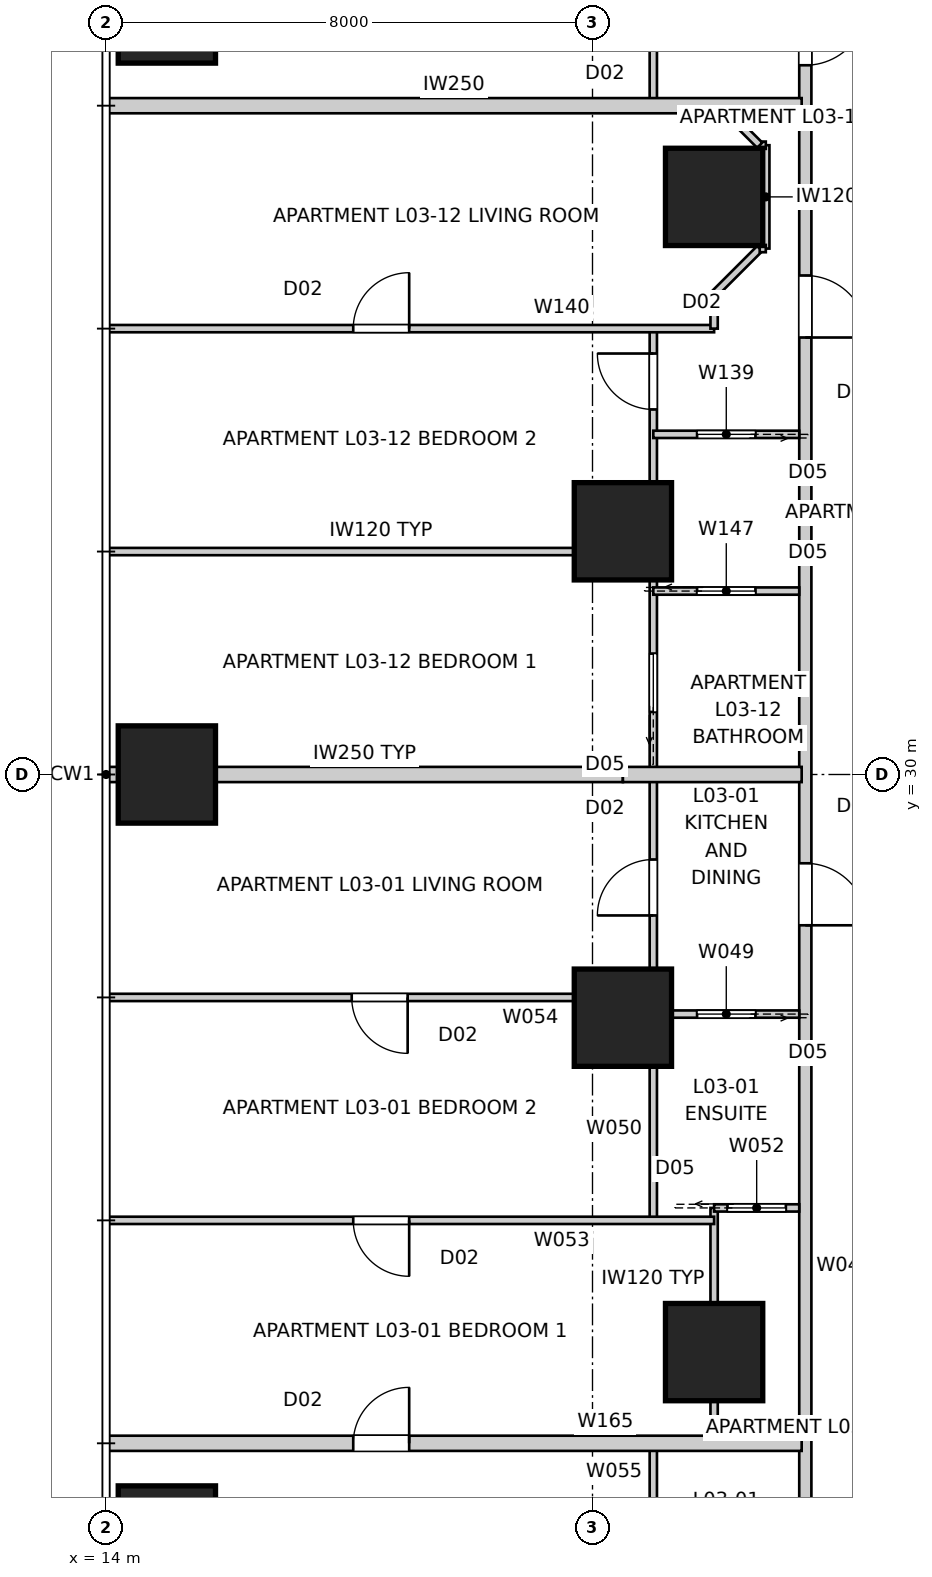
"""IFC4 building model, lengths in metres.
Left out: names, types, materials, properties, quantities, classifications, styles, units other than length and angle.
Written with IfcOpenShell. Run it as: python <this file> out.ifc"""

import sys

from ifc_helpers import new_model, si_unit, direction, frame, frame_2d, origin, origin_2d, place, context, subcontext, project, spatial, rectangle, extrude, element, fill, save


model = new_model("IFC4")
c1 = context("Model", 3, precision=1e-05, world=origin(), true_north=direction((0.0, 1.0)))
c2 = subcontext(c1, "Body", "Model", "MODEL_VIEW")
j1 = project(units=[si_unit("LENGTHUNIT", "METRE"), si_unit("PLANEANGLEUNIT", "RADIAN")], contexts=[c1])
p1 = place(None, origin())
s1 = spatial("IfcSite", under=j1, at=p1, CompositionType="ELEMENT")
p2 = place(p1, origin())
s2 = spatial("IfcBuilding", under=s1, at=p2, CompositionType="ELEMENT")
p3 = place(p2, frame((0.0, 0.0, 15.0)))
s3 = spatial("IfcBuildingStorey", under=s2, at=p3, CompositionType="ELEMENT", Elevation=15.0)
for number, where, z_axis, x_axis in (
    (1, (15.0, 42.5, 0.0), (0.0, 0.0, 1.0), (1.0, 0.0, 0.0)),
    (2, (15.0, 30.0, 0.0), (0.0, 0.0, 1.0), (1.0, 0.0, 0.0)),
    (3, (15.0, 17.5, 0.0), (0.0, 0.0, 1.0), (1.0, 0.0, 0.0)),
    (4, (24.0, 39.5, 0.0), (0.0, 0.0, 1.0), (1.0, 0.0, 0.0)),
    (5, (22.5, 34.0, 0.0), (0.0, 0.0, 1.0), (1.0, 0.0, 0.0)),
    (6, (22.5, 26.0, 0.0), (0.0, 0.0, 1.0), (1.0, 0.0, 0.0)),
    (7, (24.0, 20.5, 0.0), (0.0, 0.0, 1.0), (1.0, 0.0, 0.0)),
):
    element("IfcColumn", number, at=place(p3, frame(where, z_axis=z_axis, x_axis=x_axis)), inside=s3, PredefinedType="COLUMN", context=c2, shape_type="SweptSolid", body=[
        extrude(rectangle(XDim=1.6, YDim=1.6, at=origin_2d()), origin(), (0.0, 0.0, 1.0), 3.4),
    ])
p4 = place(p3, frame((25.5, 43.7, 0.0), z_axis=(0.0, 0.0, 1.0), x_axis=(0.0, -1.0, 0.0)))
e8 = element("IfcWall", 8, at=p4, inside=s3, PredefinedType="PARTITIONING", context=c2, shape_type="SweptSolid", body=[
    extrude(rectangle(XDim=27.4, YDim=0.2, at=frame_2d((13.7, 0.0))), origin(), (0.0, 0.0, 1.0), 3.25),
])
p5 = place(p4, frame((5.493, 0.0, 0.0)))
e9 = element("IfcOpeningElement", 9, at=p5, cuts=e8, PredefinedType="OPENING", context=c2, shape_type="SweptSolid", body=[
    extrude(rectangle(XDim=1.02, YDim=2.34, at=frame_2d((0.51, 1.17))), frame((0.0, 0.11, 0.0), z_axis=(0.0, -1.0, 0.0), x_axis=(1.0, 0.0, 0.0)), (0.0, 0.0, 1.0), 0.22),
])
p6 = place(p4, frame((15.16, 0.0, 0.0)))
e10 = element("IfcOpeningElement", 10, at=p6, cuts=e8, PredefinedType="OPENING", context=c2, shape_type="SweptSolid", body=[
    extrude(rectangle(XDim=1.02, YDim=2.34, at=frame_2d((0.51, 1.17))), frame((0.0, 0.11, 0.0), z_axis=(0.0, -1.0, 0.0), x_axis=(1.0, 0.0, 0.0)), (0.0, 0.0, 1.0), 0.22),
])
p7 = place(p4, frame((1.015, 0.0, 0.0)))
e11 = element("IfcOpeningElement", 11, at=p7, cuts=e8, PredefinedType="OPENING", context=c2, shape_type="SweptSolid", body=[
    extrude(rectangle(XDim=1.02, YDim=2.34, at=frame_2d((0.51, 1.17))), frame((0.0, 0.11, 0.0), z_axis=(0.0, -1.0, 0.0), x_axis=(1.0, 0.0, 0.0)), (0.0, 0.0, 1.0), 0.22),
])
p8 = place(p3, frame((14.0, 41.0, 0.0), z_axis=(0.0, 0.0, 1.0), x_axis=(1.0, 0.0, 0.0)))
e12 = element("IfcWall", 12, at=p8, inside=s3, PredefinedType="PARTITIONING", context=c2, shape_type="SweptSolid", body=[
    extrude(rectangle(XDim=11.44, YDim=0.25, at=frame_2d((5.72, 0.0))), origin(), (0.0, 0.0, 1.0), 3.25),
])
p9 = place(p3, frame((14.0, 30.0, 0.0), z_axis=(0.0, 0.0, 1.0), x_axis=(1.0, 0.0, 0.0)))
e13 = element("IfcWall", 13, at=p9, inside=s3, PredefinedType="PARTITIONING", context=c2, shape_type="SweptSolid", body=[
    extrude(rectangle(XDim=8.5, YDim=0.25, at=frame_2d((4.25, 0.0))), origin(), (0.0, 0.0, 1.0), 3.25),
])
p10 = place(p3, frame((22.5, 30.0, 0.0), z_axis=(0.0, 0.0, 1.0), x_axis=(1.0, 0.0, 0.0)))
e14 = element("IfcWall", 14, at=p10, inside=s3, PredefinedType="PARTITIONING", context=c2, shape_type="SweptSolid", body=[
    extrude(rectangle(XDim=2.94, YDim=0.25, at=frame_2d((1.47, 0.0))), origin(), (0.0, 0.0, 1.0), 2.796),
])
p11 = place(p3, frame((14.0, 19.0, 0.0), z_axis=(0.0, 0.0, 1.0), x_axis=(1.0, 0.0, 0.0)))
e15 = element("IfcWall", 15, at=p11, inside=s3, PredefinedType="PARTITIONING", context=c2, shape_type="SweptSolid", body=[
    extrude(rectangle(XDim=11.44, YDim=0.25, at=frame_2d((5.72, 0.0))), origin(), (0.0, 0.0, 1.0), 3.25),
])
p12 = place(p11, frame((4.065, 0.0, 0.0)))
e16 = element("IfcOpeningElement", 16, at=p12, cuts=e15, PredefinedType="OPENING", context=c2, shape_type="SweptSolid", body=[
    extrude(rectangle(XDim=0.92, YDim=2.34, at=frame_2d((0.46, 1.17))), frame((0.0, 0.135, 0.0), z_axis=(0.0, -1.0, 0.0), x_axis=(1.0, 0.0, 0.0)), (0.0, 0.0, 1.0), 0.27),
])
p13 = place(p3, frame((25.4, 26.06, 0.0), z_axis=(0.0, 0.0, 1.0), x_axis=(-1.0, 0.0, 0.0)))
e17 = element("IfcWall", 17, at=p13, inside=s3, PredefinedType="PARTITIONING", context=c2, shape_type="SweptSolid", body=[
    extrude(rectangle(XDim=2.4, YDim=0.12, at=frame_2d((1.2, 0.0))), origin(), (0.0, 0.0, 1.0), 3.25),
])
p14 = place(p13, frame((0.72, 0.0, 0.0)))
e18 = element("IfcOpeningElement", 18, at=p14, cuts=e17, PredefinedType="OPENING", context=c2, shape_type="SweptSolid", body=[
    extrude(rectangle(XDim=0.96, YDim=2.1, at=frame_2d((0.48, 1.05))), frame((0.0, 0.07, 0.0), z_axis=(0.0, -1.0, 0.0), x_axis=(1.0, 0.0, 0.0)), (0.0, 0.0, 1.0), 0.14),
])
p15 = place(p3, frame((23.0, 22.667, 0.0), z_axis=(0.0, 0.0, 1.0), x_axis=(0.0, 1.0, 0.0)))
e19 = element("IfcWall", 19, at=p15, inside=s3, PredefinedType="PARTITIONING", context=c2, shape_type="SweptSolid", body=[
    extrude(rectangle(XDim=14.667, YDim=0.12, at=frame_2d((7.333, 0.0))), origin(), (0.0, 0.0, 1.0), 2.549),
])
p16 = place(p15, frame((13.337, 0.0, 0.0)))
e20 = element("IfcOpeningElement", 20, at=p16, cuts=e19, PredefinedType="OPENING", context=c2, shape_type="SweptSolid", body=[
    extrude(rectangle(XDim=0.92, YDim=2.34, at=frame_2d((0.46, 1.17))), frame((0.0, 0.07, 0.0), z_axis=(0.0, -1.0, 0.0), x_axis=(1.0, 0.0, 0.0)), (0.0, 0.0, 1.0), 0.14),
])
p17 = place(p15, frame((5.015, 0.0, 0.0)))
e21 = element("IfcOpeningElement", 21, at=p17, cuts=e19, PredefinedType="OPENING", context=c2, shape_type="SweptSolid", body=[
    extrude(rectangle(XDim=0.92, YDim=2.34, at=frame_2d((0.46, 1.17))), frame((0.0, 0.07, 0.0), z_axis=(0.0, -1.0, 0.0), x_axis=(1.0, 0.0, 0.0)), (0.0, 0.0, 1.0), 0.14),
])
p18 = place(p15, frame((8.362, 0.0, 0.0)))
e22 = element("IfcOpeningElement", 22, at=p18, cuts=e19, PredefinedType="OPENING", context=c2, shape_type="SweptSolid", body=[
    extrude(rectangle(XDim=0.96, YDim=2.1, at=frame_2d((0.48, 1.05))), frame((0.0, 0.07, 0.0), z_axis=(0.0, -1.0, 0.0), x_axis=(1.0, 0.0, 0.0)), (0.0, 0.0, 1.0), 0.14),
])
p19 = place(p3, frame((24.0, 19.0, 0.0), z_axis=(0.0, 0.0, 1.0), x_axis=(0.0, 1.0, 0.0)))
e23 = element("IfcWall", 23, at=p19, inside=s3, PredefinedType="PARTITIONING", context=c2, shape_type="SweptSolid", body=[
    extrude(rectangle(XDim=3.871, YDim=0.12, at=frame_2d((1.936, 0.0))), origin(), (0.0, 0.0, 1.0), 2.549),
])
p20 = place(p3, frame((24.0, 22.871, 0.0), z_axis=(0.0, 0.0, 1.0), x_axis=(1.0, 0.0, 0.0)))
e24 = element("IfcWall", 24, at=p20, inside=s3, PredefinedType="PARTITIONING", context=c2, shape_type="SweptSolid", body=[
    extrude(rectangle(XDim=1.4, YDim=0.12, at=frame_2d((0.7, 0.0))), origin(), (0.0, 0.0, 1.0), 3.25),
])
p21 = place(p20, frame((0.22, 0.0, 0.0)))
e25 = element("IfcOpeningElement", 25, at=p21, cuts=e24, PredefinedType="OPENING", context=c2, shape_type="SweptSolid", body=[
    extrude(rectangle(XDim=0.96, YDim=2.1, at=frame_2d((0.48, 1.05))), frame((0.0, 0.07, 0.0), z_axis=(0.0, -1.0, 0.0), x_axis=(1.0, 0.0, 0.0)), (0.0, 0.0, 1.0), 0.14),
])
p22 = place(p3, frame((24.0, 22.667, 0.0), z_axis=(0.0, 0.0, 1.0), x_axis=(-1.0, 0.0, 0.0)))
e26 = element("IfcWall", 26, at=p22, inside=s3, PredefinedType="PARTITIONING", context=c2, shape_type="SweptSolid", body=[
    extrude(rectangle(XDim=9.96, YDim=0.12, at=frame_2d((4.98, 0.0))), origin(), (0.0, 0.0, 1.0), 3.25),
])
p23 = place(p22, frame((5.015, 0.0, 0.0)))
e27 = element("IfcOpeningElement", 27, at=p23, cuts=e26, PredefinedType="OPENING", context=c2, shape_type="SweptSolid", body=[
    extrude(rectangle(XDim=0.92, YDim=2.34, at=frame_2d((0.46, 1.17))), frame((0.0, 0.07, 0.0), z_axis=(0.0, -1.0, 0.0), x_axis=(1.0, 0.0, 0.0)), (0.0, 0.0, 1.0), 0.14),
])
p24 = place(p3, frame((23.0, 26.333, 0.0), z_axis=(0.0, 0.0, 1.0), x_axis=(-1.0, 0.0, 0.0)))
e28 = element("IfcWall", 28, at=p24, inside=s3, PredefinedType="PARTITIONING", context=c2, shape_type="SweptSolid", body=[
    extrude(rectangle(XDim=8.96, YDim=0.12, at=frame_2d((4.48, 0.0))), origin(), (0.0, 0.0, 1.0), 3.25),
])
p25 = place(p24, frame((4.04, 0.0, 0.0)))
e29 = element("IfcOpeningElement", 29, at=p25, cuts=e28, PredefinedType="OPENING", context=c2, shape_type="SweptSolid", body=[
    extrude(rectangle(XDim=0.92, YDim=2.34, at=frame_2d((0.46, 1.17))), frame((0.0, 0.07, 0.0), z_axis=(0.0, -1.0, 0.0), x_axis=(1.0, 0.0, 0.0)), (0.0, 0.0, 1.0), 0.14),
])
p26 = place(p3, frame((23.0, 16.2, 0.0), z_axis=(0.0, 0.0, 1.0), x_axis=(0.0, 1.0, 0.0)))
e30 = element("IfcWall", 30, at=p26, inside=s3, PredefinedType="PARTITIONING", context=c2, shape_type="SweptSolid", body=[
    extrude(rectangle(XDim=2.8, YDim=0.12, at=frame_2d((1.4, 0.0))), origin(), (0.0, 0.0, 1.0), 3.25),
])
p27 = place(p26, frame((0.94, 0.0, 0.0)))
e31 = element("IfcOpeningElement", 31, at=p27, cuts=e30, PredefinedType="OPENING", context=c2, shape_type="SweptSolid", body=[
    extrude(rectangle(XDim=0.92, YDim=2.34, at=frame_2d((0.46, 1.17))), frame((0.0, 0.07, 0.0), z_axis=(0.0, -1.0, 0.0), x_axis=(1.0, 0.0, 0.0)), (0.0, 0.0, 1.0), 0.14),
])
p28 = place(p3, frame((23.0, 41.0, 0.0), z_axis=(0.0, 0.0, 1.0), x_axis=(0.0, 1.0, 0.0)))
e32 = element("IfcWall", 32, at=p28, inside=s3, PredefinedType="PARTITIONING", context=c2, shape_type="SweptSolid", body=[
    extrude(rectangle(XDim=6.0, YDim=0.12, at=frame_2d((3.0, 0.0))), origin(), (0.0, 0.0, 1.0), 3.25),
])
p29 = place(p28, frame((1.351, 0.0, 0.0)))
e33 = element("IfcOpeningElement", 33, at=p29, cuts=e32, PredefinedType="OPENING", context=c2, shape_type="SweptSolid", body=[
    extrude(rectangle(XDim=0.92, YDim=2.34, at=frame_2d((0.46, 1.17))), frame((0.0, 0.07, 0.0), z_axis=(0.0, -1.0, 0.0), x_axis=(1.0, 0.0, 0.0)), (0.0, 0.0, 1.0), 0.14),
])
p30 = place(p3, frame((25.4, 35.594, 0.0), z_axis=(0.0, 0.0, 1.0), x_axis=(-1.0, 0.0, 0.0)))
e34 = element("IfcWall", 34, at=p30, inside=s3, PredefinedType="PARTITIONING", context=c2, shape_type="SweptSolid", body=[
    extrude(rectangle(XDim=2.4, YDim=0.12, at=frame_2d((1.2, 0.0))), origin(), (0.0, 0.0, 1.0), 3.25),
])
p31 = place(p30, frame((0.72, 0.0, 0.0)))
e35 = element("IfcOpeningElement", 35, at=p31, cuts=e34, PredefinedType="OPENING", context=c2, shape_type="SweptSolid", body=[
    extrude(rectangle(XDim=0.96, YDim=2.1, at=frame_2d((0.48, 1.05))), frame((0.0, 0.07, 0.0), z_axis=(0.0, -1.0, 0.0), x_axis=(1.0, 0.0, 0.0)), (0.0, 0.0, 1.0), 0.14),
])
p32 = place(p3, frame((14.04, 37.333, 0.0), z_axis=(0.0, 0.0, 1.0), x_axis=(1.0, 0.0, 0.0)))
e36 = element("IfcWall", 36, at=p32, inside=s3, PredefinedType="PARTITIONING", context=c2, shape_type="SweptSolid", body=[
    extrude(rectangle(XDim=9.96, YDim=0.12, at=frame_2d((4.98, 0.0))), origin(), (0.0, 0.0, 1.0), 3.25),
])
p33 = place(p32, frame((4.025, 0.0, 0.0)))
e37 = element("IfcOpeningElement", 37, at=p33, cuts=e36, PredefinedType="OPENING", context=c2, shape_type="SweptSolid", body=[
    extrude(rectangle(XDim=0.92, YDim=2.34, at=frame_2d((0.46, 1.17))), frame((0.0, 0.07, 0.0), z_axis=(0.0, -1.0, 0.0), x_axis=(1.0, 0.0, 0.0)), (0.0, 0.0, 1.0), 0.14),
])
p34 = place(p3, frame((24.0, 37.333, 0.0), z_axis=(0.0, 0.0, 1.0), x_axis=(0.0, 1.0, 0.0)))
e38 = element("IfcWall", 38, at=p34, inside=s3, PredefinedType="PARTITIONING", context=c2, shape_type="SweptSolid", body=[
    extrude(rectangle(XDim=0.567, YDim=0.12, at=frame_2d((0.283, 0.0))), origin(), (0.0, 0.0, 1.0), 3.25),
])
p35 = place(p3, frame((24.0, 37.9, 0.0), z_axis=(0.0, 0.0, 1.0), x_axis=(0.707106781187, 0.707106781187, 0.0)))
e39 = element("IfcWall", 39, at=p35, inside=s3, PredefinedType="PARTITIONING", context=c2, shape_type="SweptSolid", body=[
    extrude(rectangle(XDim=1.061, YDim=0.12, at=frame_2d((0.53, 0.0))), origin(), (0.0, 0.0, 1.0), 3.25),
])
p36 = place(p3, frame((24.85, 38.65, 0.0), z_axis=(0.0, 0.0, 1.0), x_axis=(0.0, 1.0, 0.0)))
e40 = element("IfcWall", 40, at=p36, inside=s3, PredefinedType="PARTITIONING", context=c2, shape_type="SweptSolid", body=[
    extrude(rectangle(XDim=1.7, YDim=0.12, at=frame_2d((0.85, 0.0))), origin(), (0.0, 0.0, 1.0), 3.25),
])
p37 = place(p3, frame((24.75, 40.35, 0.0), z_axis=(0.0, 0.0, 1.0), x_axis=(-0.707106781187, 0.707106781187, 0.0)))
e41 = element("IfcWall", 41, at=p37, inside=s3, PredefinedType="PARTITIONING", context=c2, shape_type="SweptSolid", body=[
    extrude(rectangle(XDim=0.919, YDim=0.12, at=frame_2d((0.459, 0.0))), origin(), (0.0, 0.0, 1.0), 3.25),
])
p38 = place(p3, frame((23.0, 33.017, 0.0), z_axis=(0.0, 0.0, 1.0), x_axis=(1.0, 0.0, 0.0)))
e42 = element("IfcWall", 42, at=p38, inside=s3, PredefinedType="PARTITIONING", context=c2, shape_type="SweptSolid", body=[
    extrude(rectangle(XDim=2.4, YDim=0.12, at=frame_2d((1.2, 0.0))), origin(), (0.0, 0.0, 1.0), 3.25),
])
p39 = place(p38, frame((0.72, 0.0, 0.0)))
e43 = element("IfcOpeningElement", 43, at=p39, cuts=e42, PredefinedType="OPENING", context=c2, shape_type="SweptSolid", body=[
    extrude(rectangle(XDim=0.96, YDim=2.1, at=frame_2d((0.48, 1.05))), frame((0.0, 0.07, 0.0), z_axis=(0.0, -1.0, 0.0), x_axis=(1.0, 0.0, 0.0)), (0.0, 0.0, 1.0), 0.14),
])
p40 = place(p3, frame((14.04, 33.667, 0.0), z_axis=(0.0, 0.0, 1.0), x_axis=(1.0, 0.0, 0.0)))
e44 = element("IfcWall", 44, at=p40, inside=s3, PredefinedType="PARTITIONING", context=c2, shape_type="SweptSolid", body=[
    extrude(rectangle(XDim=8.96, YDim=0.12, at=frame_2d((4.48, 0.0))), origin(), (0.0, 0.0, 1.0), 3.25),
])
for number, where, z_axis, x_axis in (
    (45, (24.85, 38.65, 0.0), (0.0, 0.0, 1.0), (-1.0, 0.0, 0.0)),
    (46, (24.85, 40.35, 0.0), (0.0, 0.0, 1.0), (-1.0, 0.0, 0.0)),
):
    element("IfcWall", number, at=place(p3, frame(where, z_axis=z_axis, x_axis=x_axis)), inside=s3, PredefinedType="PARTITIONING", context=c2, shape_type="SweptSolid", body=[
        extrude(rectangle(XDim=0.1, YDim=0.12, at=frame_2d((0.05, 0.0))), origin(), (0.0, 0.0, 1.0), 3.25),
    ])
p41 = place(p5, origin())
e47 = element("IfcDoor", 47, at=p41, inside=s3, OperationType="SINGLE_SWING_RIGHT", PredefinedType="DOOR", context=c2, shape_type="SweptSolid", body=[
    extrude(rectangle(XDim=1.02, YDim=2.34, at=frame_2d((0.51, 1.17))), frame((0.0, 0.025, 0.0), z_axis=(0.0, -1.0, 0.0), x_axis=(1.0, 0.0, 0.0)), (0.0, 0.0, 1.0), 0.05),
])
fill(e9, e47)
p42 = place(p6, origin())
e48 = element("IfcDoor", 48, at=p42, inside=s3, OperationType="SINGLE_SWING_RIGHT", PredefinedType="DOOR", context=c2, shape_type="SweptSolid", body=[
    extrude(rectangle(XDim=1.02, YDim=2.34, at=frame_2d((0.51, 1.17))), frame((0.0, 0.025, 0.0), z_axis=(0.0, -1.0, 0.0), x_axis=(1.0, 0.0, 0.0)), (0.0, 0.0, 1.0), 0.05),
])
fill(e10, e48)
p43 = place(p7, origin())
e49 = element("IfcDoor", 49, at=p43, inside=s3, OperationType="SINGLE_SWING_LEFT", PredefinedType="DOOR", context=c2, shape_type="SweptSolid", body=[
    extrude(rectangle(XDim=1.02, YDim=2.34, at=frame_2d((0.51, 1.17))), frame((0.0, 0.025, 0.0), z_axis=(0.0, -1.0, 0.0), x_axis=(1.0, 0.0, 0.0)), (0.0, 0.0, 1.0), 0.05),
])
fill(e11, e49)
p44 = place(p31, origin())
e50 = element("IfcDoor", 50, at=p44, inside=s3, OperationType="SLIDING_TO_LEFT", PredefinedType="DOOR", context=c2, shape_type="SweptSolid", body=[
    extrude(rectangle(XDim=0.96, YDim=2.1, at=frame_2d((0.48, 1.05))), frame((0.0, 0.025, 0.0), z_axis=(0.0, -1.0, 0.0), x_axis=(1.0, 0.0, 0.0)), (0.0, 0.0, 1.0), 0.05),
])
fill(e35, e50)
p45 = place(p16, origin())
e51 = element("IfcDoor", 51, at=p45, inside=s3, OperationType="SINGLE_SWING_RIGHT", PredefinedType="DOOR", context=c2, shape_type="SweptSolid", body=[
    extrude(rectangle(XDim=0.92, YDim=2.34, at=frame_2d((0.46, 1.17))), frame((0.0, 0.025, 0.0), z_axis=(0.0, -1.0, 0.0), x_axis=(1.0, 0.0, 0.0)), (0.0, 0.0, 1.0), 0.05),
])
fill(e20, e51)
p46 = place(p17, origin())
e52 = element("IfcDoor", 52, at=p46, inside=s3, OperationType="SINGLE_SWING_LEFT", PredefinedType="DOOR", context=c2, shape_type="SweptSolid", body=[
    extrude(rectangle(XDim=0.92, YDim=2.34, at=frame_2d((0.46, 1.17))), frame((0.0, 0.025, 0.0), z_axis=(0.0, -1.0, 0.0), x_axis=(1.0, 0.0, 0.0)), (0.0, 0.0, 1.0), 0.05),
])
fill(e21, e52)
p47 = place(p14, origin())
e53 = element("IfcDoor", 53, at=p47, inside=s3, OperationType="SLIDING_TO_LEFT", PredefinedType="DOOR", context=c2, shape_type="SweptSolid", body=[
    extrude(rectangle(XDim=0.96, YDim=2.1, at=frame_2d((0.48, 1.05))), frame((0.0, 0.025, 0.0), z_axis=(0.0, -1.0, 0.0), x_axis=(1.0, 0.0, 0.0)), (0.0, 0.0, 1.0), 0.05),
])
fill(e18, e53)
p48 = place(p39, origin())
e54 = element("IfcDoor", 54, at=p48, inside=s3, OperationType="SLIDING_TO_LEFT", PredefinedType="DOOR", context=c2, shape_type="SweptSolid", body=[
    extrude(rectangle(XDim=0.96, YDim=2.1, at=frame_2d((0.48, 1.05))), frame((0.0, 0.025, 0.0), z_axis=(0.0, -1.0, 0.0), x_axis=(1.0, 0.0, 0.0)), (0.0, 0.0, 1.0), 0.05),
])
fill(e43, e54)
p49 = place(p25, origin())
e55 = element("IfcDoor", 55, at=p49, inside=s3, OperationType="SINGLE_SWING_LEFT", PredefinedType="DOOR", context=c2, shape_type="SweptSolid", body=[
    extrude(rectangle(XDim=0.92, YDim=2.34, at=frame_2d((0.46, 1.17))), frame((0.0, 0.025, 0.0), z_axis=(0.0, -1.0, 0.0), x_axis=(1.0, 0.0, 0.0)), (0.0, 0.0, 1.0), 0.05),
])
fill(e29, e55)
p50 = place(p21, origin())
e56 = element("IfcDoor", 56, at=p50, inside=s3, OperationType="SLIDING_TO_LEFT", PredefinedType="DOOR", context=c2, shape_type="SweptSolid", body=[
    extrude(rectangle(XDim=0.96, YDim=2.1, at=frame_2d((0.48, 1.05))), frame((0.0, 0.025, 0.0), z_axis=(0.0, -1.0, 0.0), x_axis=(1.0, 0.0, 0.0)), (0.0, 0.0, 1.0), 0.05),
])
fill(e25, e56)
p51 = place(p18, origin())
e57 = element("IfcDoor", 57, at=p51, inside=s3, OperationType="SLIDING_TO_LEFT", PredefinedType="DOOR", context=c2, shape_type="SweptSolid", body=[
    extrude(rectangle(XDim=0.96, YDim=2.1, at=frame_2d((0.48, 1.05))), frame((0.0, 0.025, 0.0), z_axis=(0.0, -1.0, 0.0), x_axis=(1.0, 0.0, 0.0)), (0.0, 0.0, 1.0), 0.05),
])
fill(e22, e57)
p52 = place(p33, origin())
e58 = element("IfcDoor", 58, at=p52, inside=s3, OperationType="SINGLE_SWING_RIGHT", PredefinedType="DOOR", context=c2, shape_type="SweptSolid", body=[
    extrude(rectangle(XDim=0.92, YDim=2.34, at=frame_2d((0.46, 1.17))), frame((0.0, 0.025, 0.0), z_axis=(0.0, -1.0, 0.0), x_axis=(1.0, 0.0, 0.0)), (0.0, 0.0, 1.0), 0.05),
])
fill(e37, e58)
p53 = place(p23, origin())
e59 = element("IfcDoor", 59, at=p53, inside=s3, OperationType="SINGLE_SWING_LEFT", PredefinedType="DOOR", context=c2, shape_type="SweptSolid", body=[
    extrude(rectangle(XDim=0.92, YDim=2.34, at=frame_2d((0.46, 1.17))), frame((0.0, 0.025, 0.0), z_axis=(0.0, -1.0, 0.0), x_axis=(1.0, 0.0, 0.0)), (0.0, 0.0, 1.0), 0.05),
])
fill(e27, e59)
p54 = place(p12, origin())
e60 = element("IfcDoor", 60, at=p54, inside=s3, OperationType="SINGLE_SWING_RIGHT", PredefinedType="DOOR", context=c2, shape_type="SweptSolid", body=[
    extrude(rectangle(XDim=0.92, YDim=2.34, at=frame_2d((0.46, 1.17))), frame((0.0, 0.025, 0.0), z_axis=(0.0, -1.0, 0.0), x_axis=(1.0, 0.0, 0.0)), (0.0, 0.0, 1.0), 0.05),
])
fill(e16, e60)
save(model, sys.argv[1])
